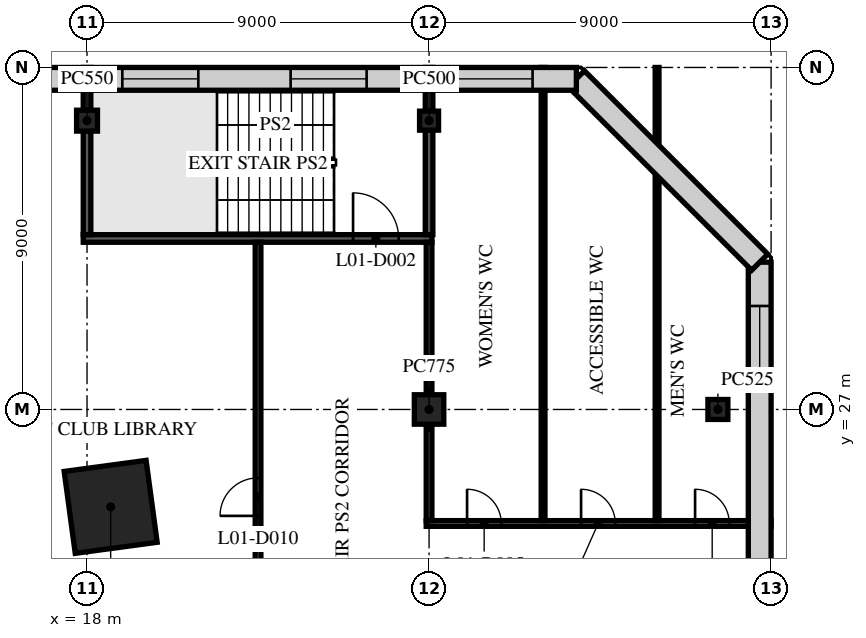
"""IFC4 building model, lengths in metres.
Left out: names, types, materials, properties, quantities, classifications, styles, units other than length and angle.
Written with IfcOpenShell. Run it as: python <this file> out.ifc"""

import sys

from ifc_helpers import new_model, si_unit, direction, frame, frame_2d, origin, origin_2d, place, context, subcontext, project, spatial, rectangle, extrude, element, fill, save


model = new_model("IFC4")
c1 = context("Model", 3, precision=1e-05, world=origin(), true_north=direction((0.0, 1.0)))
c2 = subcontext(c1, "Body", "Model", "MODEL_VIEW")
j1 = project(units=[si_unit("LENGTHUNIT", "METRE"), si_unit("PLANEANGLEUNIT", "RADIAN")], contexts=[c1])
p1 = place(None, origin())
s1 = spatial("IfcSite", under=j1, at=p1, CompositionType="ELEMENT")
p2 = place(p1, origin())
s2 = spatial("IfcBuilding", under=s1, at=p2, CompositionType="ELEMENT")
p3 = place(p2, frame((0.0, 0.0, 4.5)))
s3 = spatial("IfcBuildingStorey", under=s2, at=p3, CompositionType="ELEMENT", Elevation=4.5)
p4 = place(p3, frame((18.0, 34.6, 0.0), z_axis=(0.0, 0.0, 1.0), x_axis=(1.0, 0.0, 0.0)))
e1 = element("IfcColumn", 1, at=p4, inside=s3, PredefinedType="COLUMN", context=c2, shape_type="SweptSolid", body=[
    extrude(rectangle(XDim=0.55, YDim=0.55, at=origin_2d()), origin(), (0.0, 0.0, 1.0), 4.5),
])
p5 = place(p3, frame((27.0, 27.0, 0.0), z_axis=(0.0, 0.0, 1.0), x_axis=(1.0, 0.0, 0.0)))
e2 = element("IfcColumn", 2, at=p5, inside=s3, PredefinedType="COLUMN", context=c2, shape_type="SweptSolid", body=[
    extrude(rectangle(XDim=0.775, YDim=0.775, at=origin_2d()), origin(), (0.0, 0.0, 1.0), 4.5),
])
p6 = place(p3, frame((27.0, 34.6, 0.0), z_axis=(0.0, 0.0, 1.0), x_axis=(1.0, 0.0, 0.0)))
e3 = element("IfcColumn", 3, at=p6, inside=s3, PredefinedType="COLUMN", context=c2, shape_type="SweptSolid", body=[
    extrude(rectangle(XDim=0.5, YDim=0.5, at=origin_2d()), origin(), (0.0, 0.0, 1.0), 4.5),
])
p7 = place(p3, frame((34.6, 27.0, 0.0), z_axis=(0.0, 0.0, 1.0), x_axis=(1.0, 0.0, 0.0)))
e4 = element("IfcColumn", 4, at=p7, inside=s3, PredefinedType="COLUMN", context=c2, shape_type="SweptSolid", body=[
    extrude(rectangle(XDim=0.525, YDim=0.525, at=origin_2d()), origin(), (0.0, 0.0, 1.0), 4.5),
])
p8 = place(p3, frame((18.622, 24.437, 0.0), z_axis=(0.0, 0.0, 1.0), x_axis=(0.991001197216, 0.133853005627, 0.0)))
e5 = element("IfcColumn", 5, at=p8, inside=s3, PredefinedType="COLUMN", context=c2, shape_type="SweptSolid", body=[
    extrude(rectangle(XDim=2.175, YDim=2.175, at=origin_2d()), origin(), (0.0, 0.0, 1.0), 4.5),
])
p9 = place(p3, frame((26.925, 24.0, 0.0), z_axis=(0.0, 0.0, 1.0), x_axis=(1.0, 0.0, 0.0)))
e6 = element("IfcWall", 6, at=p9, inside=s3, PredefinedType="PARTITIONING", context=c2, shape_type="SweptSolid", body=[
    extrude(rectangle(XDim=9.075, YDim=0.15, at=frame_2d((4.538, 0.0))), origin(), (0.0, 0.0, 1.0), 4.1),
])
p10 = place(p9, frame((1.075, 0.0, 0.0)))
e7 = element("IfcOpeningElement", 7, at=p10, cuts=e6, PredefinedType="OPENING", context=c2, shape_type="SweptSolid", body=[
    extrude(rectangle(XDim=0.9, YDim=2.1, at=frame_2d((0.45, 1.05))), frame((0.0, 0.085, 0.0), z_axis=(0.0, -1.0, 0.0), x_axis=(1.0, 0.0, 0.0)), (0.0, 0.0, 1.0), 0.17),
])
p11 = place(p9, frame((4.075, 0.0, 0.0)))
e8 = element("IfcOpeningElement", 8, at=p11, cuts=e6, PredefinedType="OPENING", context=c2, shape_type="SweptSolid", body=[
    extrude(rectangle(XDim=0.9, YDim=2.1, at=frame_2d((0.45, 1.05))), frame((0.0, 0.085, 0.0), z_axis=(0.0, -1.0, 0.0), x_axis=(1.0, 0.0, 0.0)), (0.0, 0.0, 1.0), 0.17),
])
p12 = place(p9, frame((7.075, 0.0, 0.0)))
e9 = element("IfcOpeningElement", 9, at=p12, cuts=e6, PredefinedType="OPENING", context=c2, shape_type="SweptSolid", body=[
    extrude(rectangle(XDim=0.9, YDim=2.1, at=frame_2d((0.45, 1.05))), frame((0.0, 0.085, 0.0), z_axis=(0.0, -1.0, 0.0), x_axis=(1.0, 0.0, 0.0)), (0.0, 0.0, 1.0), 0.17),
])
p13 = place(p3, frame((17.9, 31.5, 0.0), z_axis=(0.0, 0.0, 1.0), x_axis=(1.0, 0.0, 0.0)))
e10 = element("IfcWall", 10, at=p13, inside=s3, PredefinedType="PARTITIONING", context=c2, shape_type="SweptSolid", body=[
    extrude(rectangle(XDim=9.175, YDim=0.2, at=frame_2d((4.587, 0.0))), origin(), (0.0, 0.0, 1.0), 4.1),
])
p14 = place(p13, frame((7.1, 0.0, 0.0)))
e11 = element("IfcOpeningElement", 11, at=p14, cuts=e10, PredefinedType="OPENING", context=c2, shape_type="SweptSolid", body=[
    extrude(rectangle(XDim=1.2, YDim=2.1, at=frame_2d((0.6, 1.05))), frame((0.0, 0.11, 0.0), z_axis=(0.0, -1.0, 0.0), x_axis=(1.0, 0.0, 0.0)), (0.0, 0.0, 1.0), 0.22),
])
p15 = place(p3, frame((18.0, 31.6, 0.0), z_axis=(0.0, 0.0, 1.0), x_axis=(0.0, 1.0, 0.0)))
e12 = element("IfcWall", 12, at=p15, inside=s3, PredefinedType="PARTITIONING", context=c2, shape_type="SweptSolid", body=[
    extrude(rectangle(XDim=2.725, YDim=0.2, at=frame_2d((1.362, 0.0))), origin(), (0.0, 0.0, 1.0), 4.1),
])
p16 = place(p3, frame((18.0, 34.875, 0.0), z_axis=(0.0, 0.0, 1.0), x_axis=(0.0, 1.0, 0.0)))
e13 = element("IfcWall", 13, at=p16, inside=s3, PredefinedType="PARTITIONING", context=c2, shape_type="SweptSolid", body=[
    extrude(rectangle(XDim=1.125, YDim=0.2, at=frame_2d((0.562, 0.0))), origin(), (0.0, 0.0, 1.0), 4.1),
])
p17 = place(p3, frame((22.5, 18.075, 0.0), z_axis=(0.0, 0.0, 1.0), x_axis=(0.0, 1.0, 0.0)))
e14 = element("IfcWall", 14, at=p17, inside=s3, PredefinedType="PARTITIONING", context=c2, shape_type="SweptSolid", body=[
    extrude(rectangle(XDim=13.325, YDim=0.15, at=frame_2d((6.663, 0.0))), origin(), (0.0, 0.0, 1.0), 4.1),
])
p18 = place(p17, frame((6.125, 0.0, 0.0)))
e15 = element("IfcOpeningElement", 15, at=p18, cuts=e14, PredefinedType="OPENING", context=c2, shape_type="SweptSolid", body=[
    extrude(rectangle(XDim=1.0, YDim=2.1, at=frame_2d((0.5, 1.05))), frame((0.0, 0.085, 0.0), z_axis=(0.0, -1.0, 0.0), x_axis=(1.0, 0.0, 0.0)), (0.0, 0.0, 1.0), 0.17),
])
p19 = place(p3, frame((27.0, 24.075, 0.0), z_axis=(0.0, 0.0, 1.0), x_axis=(0.0, 1.0, 0.0)))
e16 = element("IfcWall", 16, at=p19, inside=s3, PredefinedType="PARTITIONING", context=c2, shape_type="SweptSolid", body=[
    extrude(rectangle(XDim=2.425, YDim=0.15, at=frame_2d((1.212, 0.0))), origin(), (0.0, 0.0, 1.0), 4.1),
])
p20 = place(p3, frame((27.0, 27.5, 0.0), z_axis=(0.0, 0.0, 1.0), x_axis=(0.0, 1.0, 0.0)))
e17 = element("IfcWall", 17, at=p20, inside=s3, PredefinedType="PARTITIONING", context=c2, shape_type="SweptSolid", body=[
    extrude(rectangle(XDim=3.9, YDim=0.15, at=frame_2d((1.95, 0.0))), origin(), (0.0, 0.0, 1.0), 4.1),
])
p21 = place(p3, frame((27.0, 31.6, 0.0), z_axis=(0.0, 0.0, 1.0), x_axis=(0.0, 1.0, 0.0)))
e18 = element("IfcWall", 18, at=p21, inside=s3, PredefinedType="PARTITIONING", context=c2, shape_type="SweptSolid", body=[
    extrude(rectangle(XDim=2.75, YDim=0.2, at=frame_2d((1.375, 0.0))), origin(), (0.0, 0.0, 1.0), 4.1),
])
p22 = place(p3, frame((27.0, 34.85, 0.0), z_axis=(0.0, 0.0, 1.0), x_axis=(0.0, 1.0, 0.0)))
e19 = element("IfcWall", 19, at=p22, inside=s3, PredefinedType="PARTITIONING", context=c2, shape_type="SweptSolid", body=[
    extrude(rectangle(XDim=1.15, YDim=0.2, at=frame_2d((0.575, 0.0))), origin(), (0.0, 0.0, 1.0), 4.1),
])
for number, where, z_axis, x_axis in (
    (20, (30.0, 24.075, 0.0), (0.0, 0.0, 1.0), (0.0, 1.0, 0.0)),
    (21, (33.0, 24.075, 0.0), (0.0, 0.0, 1.0), (0.0, 1.0, 0.0)),
):
    element("IfcWall", number, at=place(p3, frame(where, z_axis=z_axis, x_axis=x_axis)), inside=s3, PredefinedType="PARTITIONING", context=c2, shape_type="SweptSolid", body=[
        extrude(rectangle(XDim=11.925, YDim=0.1, at=frame_2d((5.962, 0.0))), origin(), (0.0, 0.0, 1.0), 4.1),
    ])
p23 = place(p3, frame((35.7, -30.876, 0.0), z_axis=(0.0, 0.0, 1.0), x_axis=(0.0, 1.0, 0.0)))
e22 = element("IfcWall", 22, at=p23, inside=s3, PredefinedType="STANDARD", context=c2, shape_type="SweptSolid", body=[
    extrude(rectangle(XDim=61.751, YDim=0.6, at=frame_2d((30.876, 0.0))), origin(), (0.0, 0.0, 1.0), 4.1),
])
p24 = place(p23, frame((1.152, 0.0, 0.9)))
e23 = element("IfcOpeningElement", 23, at=p24, cuts=e22, PredefinedType="OPENING", context=c2, shape_type="SweptSolid", body=[
    extrude(rectangle(XDim=2.0, YDim=3.0, at=frame_2d((1.0, 1.5))), frame((0.0, 0.31, 0.0), z_axis=(0.0, -1.0, 0.0), x_axis=(1.0, 0.0, 0.0)), (0.0, 0.0, 1.0), 0.62),
])
p25 = place(p23, frame((5.519, 0.0, 0.9)))
e24 = element("IfcOpeningElement", 24, at=p25, cuts=e22, PredefinedType="OPENING", context=c2, shape_type="SweptSolid", body=[
    extrude(rectangle(XDim=2.0, YDim=3.0, at=frame_2d((1.0, 1.5))), frame((0.0, 0.31, 0.0), z_axis=(0.0, -1.0, 0.0), x_axis=(1.0, 0.0, 0.0)), (0.0, 0.0, 1.0), 0.62),
])
p26 = place(p23, frame((9.947, 0.0, 0.9)))
e25 = element("IfcOpeningElement", 25, at=p26, cuts=e22, PredefinedType="OPENING", context=c2, shape_type="SweptSolid", body=[
    extrude(rectangle(XDim=2.0, YDim=3.0, at=frame_2d((1.0, 1.5))), frame((0.0, 0.31, 0.0), z_axis=(0.0, -1.0, 0.0), x_axis=(1.0, 0.0, 0.0)), (0.0, 0.0, 1.0), 0.62),
])
p27 = place(p23, frame((14.376, 0.0, 0.9)))
e26 = element("IfcOpeningElement", 26, at=p27, cuts=e22, PredefinedType="OPENING", context=c2, shape_type="SweptSolid", body=[
    extrude(rectangle(XDim=2.0, YDim=3.0, at=frame_2d((1.0, 1.5))), frame((0.0, 0.31, 0.0), z_axis=(0.0, -1.0, 0.0), x_axis=(1.0, 0.0, 0.0)), (0.0, 0.0, 1.0), 0.62),
])
p28 = place(p23, frame((18.804, 0.0, 0.9)))
e27 = element("IfcOpeningElement", 27, at=p28, cuts=e22, PredefinedType="OPENING", context=c2, shape_type="SweptSolid", body=[
    extrude(rectangle(XDim=2.0, YDim=3.0, at=frame_2d((1.0, 1.5))), frame((0.0, 0.31, 0.0), z_axis=(0.0, -1.0, 0.0), x_axis=(1.0, 0.0, 0.0)), (0.0, 0.0, 1.0), 0.62),
])
p29 = place(p23, frame((23.233, 0.0, 0.9)))
e28 = element("IfcOpeningElement", 28, at=p29, cuts=e22, PredefinedType="OPENING", context=c2, shape_type="SweptSolid", body=[
    extrude(rectangle(XDim=2.0, YDim=3.0, at=frame_2d((1.0, 1.5))), frame((0.0, 0.31, 0.0), z_axis=(0.0, -1.0, 0.0), x_axis=(1.0, 0.0, 0.0)), (0.0, 0.0, 1.0), 0.62),
])
p30 = place(p23, frame((27.662, 0.0, 0.9)))
e29 = element("IfcOpeningElement", 29, at=p30, cuts=e22, PredefinedType="OPENING", context=c2, shape_type="SweptSolid", body=[
    extrude(rectangle(XDim=2.0, YDim=3.0, at=frame_2d((1.0, 1.5))), frame((0.0, 0.31, 0.0), z_axis=(0.0, -1.0, 0.0), x_axis=(1.0, 0.0, 0.0)), (0.0, 0.0, 1.0), 0.62),
])
p31 = place(p23, frame((32.09, 0.0, 0.9)))
e30 = element("IfcOpeningElement", 30, at=p31, cuts=e22, PredefinedType="OPENING", context=c2, shape_type="SweptSolid", body=[
    extrude(rectangle(XDim=2.0, YDim=3.0, at=frame_2d((1.0, 1.5))), frame((0.0, 0.31, 0.0), z_axis=(0.0, -1.0, 0.0), x_axis=(1.0, 0.0, 0.0)), (0.0, 0.0, 1.0), 0.62),
])
p32 = place(p23, frame((36.519, 0.0, 0.9)))
e31 = element("IfcOpeningElement", 31, at=p32, cuts=e22, PredefinedType="OPENING", context=c2, shape_type="SweptSolid", body=[
    extrude(rectangle(XDim=2.0, YDim=3.0, at=frame_2d((1.0, 1.5))), frame((0.0, 0.31, 0.0), z_axis=(0.0, -1.0, 0.0), x_axis=(1.0, 0.0, 0.0)), (0.0, 0.0, 1.0), 0.62),
])
p33 = place(p23, frame((45.376, 0.0, 0.9)))
e32 = element("IfcOpeningElement", 32, at=p33, cuts=e22, PredefinedType="OPENING", context=c2, shape_type="SweptSolid", body=[
    extrude(rectangle(XDim=2.0, YDim=3.0, at=frame_2d((1.0, 1.5))), frame((0.0, 0.31, 0.0), z_axis=(0.0, -1.0, 0.0), x_axis=(1.0, 0.0, 0.0)), (0.0, 0.0, 1.0), 0.62),
])
p34 = place(p23, frame((49.804, 0.0, 0.9)))
e33 = element("IfcOpeningElement", 33, at=p34, cuts=e22, PredefinedType="OPENING", context=c2, shape_type="SweptSolid", body=[
    extrude(rectangle(XDim=2.0, YDim=3.0, at=frame_2d((1.0, 1.5))), frame((0.0, 0.31, 0.0), z_axis=(0.0, -1.0, 0.0), x_axis=(1.0, 0.0, 0.0)), (0.0, 0.0, 1.0), 0.62),
])
p35 = place(p23, frame((58.599, 0.0, 0.9)))
e34 = element("IfcOpeningElement", 34, at=p35, cuts=e22, PredefinedType="OPENING", context=c2, shape_type="SweptSolid", body=[
    extrude(rectangle(XDim=2.0, YDim=3.0, at=frame_2d((1.0, 1.5))), frame((0.0, 0.31, 0.0), z_axis=(0.0, -1.0, 0.0), x_axis=(1.0, 0.0, 0.0)), (0.0, 0.0, 1.0), 0.62),
])
p36 = place(p3, frame((35.7, 30.876, 0.0), z_axis=(0.0, 0.0, 1.0), x_axis=(-0.707106781187, 0.707106781187, 0.0)))
e35 = element("IfcWall", 35, at=p36, inside=s3, PredefinedType="STANDARD", context=c2, shape_type="SweptSolid", body=[
    extrude(rectangle(XDim=6.823, YDim=0.6, at=frame_2d((3.411, 0.0))), origin(), (0.0, 0.0, 1.0), 4.1),
])
p37 = place(p3, frame((30.876, 35.7, 0.0), z_axis=(0.0, 0.0, 1.0), x_axis=(-1.0, 0.0, 0.0)))
e36 = element("IfcWall", 36, at=p37, inside=s3, PredefinedType="STANDARD", context=c2, shape_type="SweptSolid", body=[
    extrude(rectangle(XDim=61.751, YDim=0.6, at=frame_2d((30.876, 0.0))), origin(), (0.0, 0.0, 1.0), 4.1),
])
p38 = place(p37, frame((1.152, 0.0, 0.9)))
e37 = element("IfcOpeningElement", 37, at=p38, cuts=e36, PredefinedType="OPENING", context=c2, shape_type="SweptSolid", body=[
    extrude(rectangle(XDim=2.0, YDim=3.0, at=frame_2d((1.0, 1.5))), frame((0.0, 0.31, 0.0), z_axis=(0.0, -1.0, 0.0), x_axis=(1.0, 0.0, 0.0)), (0.0, 0.0, 1.0), 0.62),
])
p39 = place(p37, frame((5.519, 0.0, 0.9)))
e38 = element("IfcOpeningElement", 38, at=p39, cuts=e36, PredefinedType="OPENING", context=c2, shape_type="SweptSolid", body=[
    extrude(rectangle(XDim=2.0, YDim=3.0, at=frame_2d((1.0, 1.5))), frame((0.0, 0.31, 0.0), z_axis=(0.0, -1.0, 0.0), x_axis=(1.0, 0.0, 0.0)), (0.0, 0.0, 1.0), 0.62),
])
p40 = place(p37, frame((9.947, 0.0, 0.9)))
e39 = element("IfcOpeningElement", 39, at=p40, cuts=e36, PredefinedType="OPENING", context=c2, shape_type="SweptSolid", body=[
    extrude(rectangle(XDim=2.0, YDim=3.0, at=frame_2d((1.0, 1.5))), frame((0.0, 0.31, 0.0), z_axis=(0.0, -1.0, 0.0), x_axis=(1.0, 0.0, 0.0)), (0.0, 0.0, 1.0), 0.62),
])
p41 = place(p37, frame((14.376, 0.0, 0.9)))
e40 = element("IfcOpeningElement", 40, at=p41, cuts=e36, PredefinedType="OPENING", context=c2, shape_type="SweptSolid", body=[
    extrude(rectangle(XDim=2.0, YDim=3.0, at=frame_2d((1.0, 1.5))), frame((0.0, 0.31, 0.0), z_axis=(0.0, -1.0, 0.0), x_axis=(1.0, 0.0, 0.0)), (0.0, 0.0, 1.0), 0.62),
])
p42 = place(p37, frame((18.804, 0.0, 0.9)))
e41 = element("IfcOpeningElement", 41, at=p42, cuts=e36, PredefinedType="OPENING", context=c2, shape_type="SweptSolid", body=[
    extrude(rectangle(XDim=2.0, YDim=3.0, at=frame_2d((1.0, 1.5))), frame((0.0, 0.31, 0.0), z_axis=(0.0, -1.0, 0.0), x_axis=(1.0, 0.0, 0.0)), (0.0, 0.0, 1.0), 0.62),
])
p43 = place(p37, frame((23.233, 0.0, 0.9)))
e42 = element("IfcOpeningElement", 42, at=p43, cuts=e36, PredefinedType="OPENING", context=c2, shape_type="SweptSolid", body=[
    extrude(rectangle(XDim=2.0, YDim=3.0, at=frame_2d((1.0, 1.5))), frame((0.0, 0.31, 0.0), z_axis=(0.0, -1.0, 0.0), x_axis=(1.0, 0.0, 0.0)), (0.0, 0.0, 1.0), 0.62),
])
p44 = place(p37, frame((27.662, 0.0, 0.9)))
e43 = element("IfcOpeningElement", 43, at=p44, cuts=e36, PredefinedType="OPENING", context=c2, shape_type="SweptSolid", body=[
    extrude(rectangle(XDim=2.0, YDim=3.0, at=frame_2d((1.0, 1.5))), frame((0.0, 0.31, 0.0), z_axis=(0.0, -1.0, 0.0), x_axis=(1.0, 0.0, 0.0)), (0.0, 0.0, 1.0), 0.62),
])
p45 = place(p37, frame((32.09, 0.0, 0.9)))
e44 = element("IfcOpeningElement", 44, at=p45, cuts=e36, PredefinedType="OPENING", context=c2, shape_type="SweptSolid", body=[
    extrude(rectangle(XDim=2.0, YDim=3.0, at=frame_2d((1.0, 1.5))), frame((0.0, 0.31, 0.0), z_axis=(0.0, -1.0, 0.0), x_axis=(1.0, 0.0, 0.0)), (0.0, 0.0, 1.0), 0.62),
])
p46 = place(p37, frame((36.519, 0.0, 0.9)))
e45 = element("IfcOpeningElement", 45, at=p46, cuts=e36, PredefinedType="OPENING", context=c2, shape_type="SweptSolid", body=[
    extrude(rectangle(XDim=2.0, YDim=3.0, at=frame_2d((1.0, 1.5))), frame((0.0, 0.31, 0.0), z_axis=(0.0, -1.0, 0.0), x_axis=(1.0, 0.0, 0.0)), (0.0, 0.0, 1.0), 0.62),
])
p47 = place(p37, frame((40.947, 0.0, 0.9)))
e46 = element("IfcOpeningElement", 46, at=p47, cuts=e36, PredefinedType="OPENING", context=c2, shape_type="SweptSolid", body=[
    extrude(rectangle(XDim=2.0, YDim=3.0, at=frame_2d((1.0, 1.5))), frame((0.0, 0.31, 0.0), z_axis=(0.0, -1.0, 0.0), x_axis=(1.0, 0.0, 0.0)), (0.0, 0.0, 1.0), 0.62),
])
p48 = place(p37, frame((45.376, 0.0, 0.9)))
e47 = element("IfcOpeningElement", 47, at=p48, cuts=e36, PredefinedType="OPENING", context=c2, shape_type="SweptSolid", body=[
    extrude(rectangle(XDim=2.0, YDim=3.0, at=frame_2d((1.0, 1.5))), frame((0.0, 0.31, 0.0), z_axis=(0.0, -1.0, 0.0), x_axis=(1.0, 0.0, 0.0)), (0.0, 0.0, 1.0), 0.62),
])
p49 = place(p37, frame((49.804, 0.0, 0.9)))
e48 = element("IfcOpeningElement", 48, at=p49, cuts=e36, PredefinedType="OPENING", context=c2, shape_type="SweptSolid", body=[
    extrude(rectangle(XDim=2.0, YDim=3.0, at=frame_2d((1.0, 1.5))), frame((0.0, 0.31, 0.0), z_axis=(0.0, -1.0, 0.0), x_axis=(1.0, 0.0, 0.0)), (0.0, 0.0, 1.0), 0.62),
])
p50 = place(p37, frame((54.233, 0.0, 0.9)))
e49 = element("IfcOpeningElement", 49, at=p50, cuts=e36, PredefinedType="OPENING", context=c2, shape_type="SweptSolid", body=[
    extrude(rectangle(XDim=2.0, YDim=3.0, at=frame_2d((1.0, 1.5))), frame((0.0, 0.31, 0.0), z_axis=(0.0, -1.0, 0.0), x_axis=(1.0, 0.0, 0.0)), (0.0, 0.0, 1.0), 0.62),
])
p51 = place(p37, frame((58.599, 0.0, 0.9)))
e50 = element("IfcOpeningElement", 50, at=p51, cuts=e36, PredefinedType="OPENING", context=c2, shape_type="SweptSolid", body=[
    extrude(rectangle(XDim=2.0, YDim=3.0, at=frame_2d((1.0, 1.5))), frame((0.0, 0.31, 0.0), z_axis=(0.0, -1.0, 0.0), x_axis=(1.0, 0.0, 0.0)), (0.0, 0.0, 1.0), 0.62),
])
p52 = place(p14, origin())
e51 = element("IfcDoor", 51, at=p52, inside=s3, OperationType="SINGLE_SWING_RIGHT", PredefinedType="DOOR", context=c2, shape_type="SweptSolid", body=[
    extrude(rectangle(XDim=1.2, YDim=2.1, at=frame_2d((0.6, 1.05))), frame((0.0, 0.025, 0.0), z_axis=(0.0, -1.0, 0.0), x_axis=(1.0, 0.0, 0.0)), (0.0, 0.0, 1.0), 0.05),
])
fill(e11, e51)
p53 = place(p10, origin())
e52 = element("IfcDoor", 52, at=p53, inside=s3, OperationType="SINGLE_SWING_LEFT", PredefinedType="DOOR", context=c2, shape_type="SweptSolid", body=[
    extrude(rectangle(XDim=0.9, YDim=2.1, at=frame_2d((0.45, 1.05))), frame((0.0, 0.025, 0.0), z_axis=(0.0, -1.0, 0.0), x_axis=(1.0, 0.0, 0.0)), (0.0, 0.0, 1.0), 0.05),
])
fill(e7, e52)
p54 = place(p11, origin())
e53 = element("IfcDoor", 53, at=p54, inside=s3, OperationType="SINGLE_SWING_RIGHT", PredefinedType="DOOR", context=c2, shape_type="SweptSolid", body=[
    extrude(rectangle(XDim=0.9, YDim=2.1, at=frame_2d((0.45, 1.05))), frame((0.0, 0.025, 0.0), z_axis=(0.0, -1.0, 0.0), x_axis=(1.0, 0.0, 0.0)), (0.0, 0.0, 1.0), 0.05),
])
fill(e8, e53)
p55 = place(p12, origin())
e54 = element("IfcDoor", 54, at=p55, inside=s3, OperationType="SINGLE_SWING_LEFT", PredefinedType="DOOR", context=c2, shape_type="SweptSolid", body=[
    extrude(rectangle(XDim=0.9, YDim=2.1, at=frame_2d((0.45, 1.05))), frame((0.0, 0.025, 0.0), z_axis=(0.0, -1.0, 0.0), x_axis=(1.0, 0.0, 0.0)), (0.0, 0.0, 1.0), 0.05),
])
fill(e9, e54)
p56 = place(p18, origin())
e55 = element("IfcDoor", 55, at=p56, inside=s3, OperationType="SINGLE_SWING_RIGHT", PredefinedType="DOOR", context=c2, shape_type="SweptSolid", body=[
    extrude(rectangle(XDim=1.0, YDim=2.1, at=frame_2d((0.5, 1.05))), frame((0.0, 0.025, 0.0), z_axis=(0.0, -1.0, 0.0), x_axis=(1.0, 0.0, 0.0)), (0.0, 0.0, 1.0), 0.05),
])
fill(e15, e55)
p57 = place(p35, origin())
e56 = element("IfcWindow", 56, at=p57, inside=s3, PartitioningType="SINGLE_PANEL", PredefinedType="WINDOW", context=c2, shape_type="SweptSolid", body=[
    extrude(rectangle(XDim=2.0, YDim=3.0, at=frame_2d((1.0, 1.5))), frame((0.0, 0.03, 0.0), z_axis=(0.0, -1.0, 0.0), x_axis=(1.0, 0.0, 0.0)), (0.0, 0.0, 1.0), 0.06),
])
fill(e34, e56)
p58 = place(p38, origin())
e57 = element("IfcWindow", 57, at=p58, inside=s3, PartitioningType="SINGLE_PANEL", PredefinedType="WINDOW", context=c2, shape_type="SweptSolid", body=[
    extrude(rectangle(XDim=2.0, YDim=3.0, at=frame_2d((1.0, 1.5))), frame((0.0, 0.03, 0.0), z_axis=(0.0, -1.0, 0.0), x_axis=(1.0, 0.0, 0.0)), (0.0, 0.0, 1.0), 0.06),
])
fill(e37, e57)
p59 = place(p39, origin())
e58 = element("IfcWindow", 58, at=p59, inside=s3, PartitioningType="SINGLE_PANEL", PredefinedType="WINDOW", context=c2, shape_type="SweptSolid", body=[
    extrude(rectangle(XDim=2.0, YDim=3.0, at=frame_2d((1.0, 1.5))), frame((0.0, 0.03, 0.0), z_axis=(0.0, -1.0, 0.0), x_axis=(1.0, 0.0, 0.0)), (0.0, 0.0, 1.0), 0.06),
])
fill(e38, e58)
p60 = place(p40, origin())
e59 = element("IfcWindow", 59, at=p60, inside=s3, PartitioningType="SINGLE_PANEL", PredefinedType="WINDOW", context=c2, shape_type="SweptSolid", body=[
    extrude(rectangle(XDim=2.0, YDim=3.0, at=frame_2d((1.0, 1.5))), frame((0.0, 0.03, 0.0), z_axis=(0.0, -1.0, 0.0), x_axis=(1.0, 0.0, 0.0)), (0.0, 0.0, 1.0), 0.06),
])
fill(e39, e59)
save(model, sys.argv[1])
